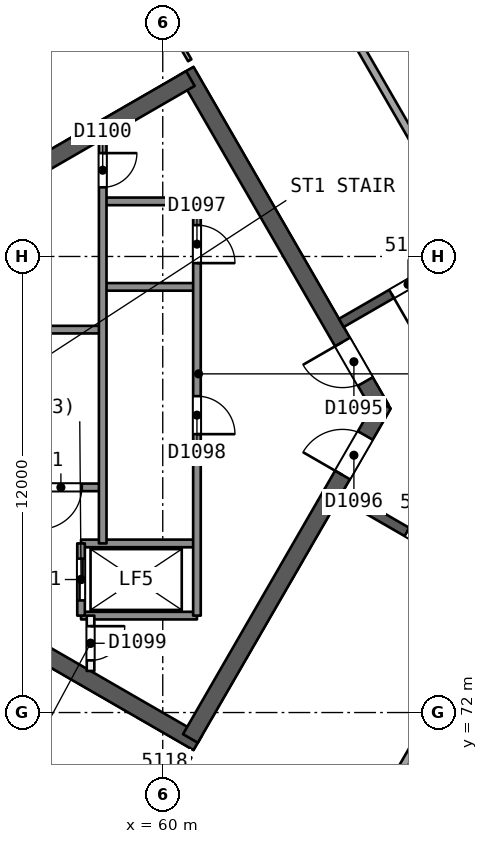
"""IFC4 building model, lengths in metres.
Left out: names, types, materials, properties, quantities, classifications, styles, units other than length and angle.
Written with IfcOpenShell. Run it as: python <this file> out.ifc"""

import sys

from ifc_helpers import new_model, si_unit, direction, frame, frame_2d, origin, place, context, subcontext, project, spatial, rectangle, extrude, element, fill, save


model = new_model("IFC4")
c1 = context("Model", 3, precision=1e-05, world=origin(), true_north=direction((0.0, 1.0)))
c2 = subcontext(c1, "Body", "Model", "MODEL_VIEW")
j1 = project(units=[si_unit("LENGTHUNIT", "METRE"), si_unit("PLANEANGLEUNIT", "RADIAN")], contexts=[c1])
p1 = place(None, origin())
s1 = spatial("IfcSite", under=j1, at=p1, CompositionType="ELEMENT")
p2 = place(p1, origin())
s2 = spatial("IfcBuilding", under=s1, at=p2, CompositionType="ELEMENT")
p3 = place(p2, frame((0.0, 0.0, 209.5)))
s3 = spatial("IfcBuildingStorey", under=s2, at=p3, CompositionType="ELEMENT", Elevation=209.5)
p4 = place(p3, frame((65.74, 80.0, 0.0), z_axis=(0.0, 0.0, 1.0), x_axis=(-0.499991857942, 0.866030104553, 0.0)))
e1 = element("IfcWall", 1, at=p4, inside=s3, PredefinedType="SHEAR", context=c2, shape_type="SweptSolid", body=[
    extrude(rectangle(XDim=10.25, YDim=0.45, at=frame_2d((5.125, 0.0))), origin(), (0.0, 0.0, 1.0), 3.7),
])
p5 = place(p4, frame((0.82, 0.0, 0.0)))
e2 = element("IfcOpeningElement", 2, at=p5, cuts=e1, PredefinedType="OPENING", context=c2, shape_type="SweptSolid", body=[
    extrude(rectangle(XDim=1.2, YDim=2.1, at=frame_2d((0.6, 1.05))), frame((0.0, 0.235, 0.0), z_axis=(0.0, -1.0, 0.0), x_axis=(1.0, 0.0, 0.0)), (0.0, 0.0, 1.0), 0.471),
])
p6 = place(p3, frame((60.728, 88.682, 0.0), z_axis=(0.0, 0.0, 1.0), x_axis=(-0.866021613849, -0.500006564303, 0.0)))
e3 = element("IfcWall", 3, at=p6, inside=s3, PredefinedType="SHEAR", context=c2, shape_type="SweptSolid", body=[
    extrude(rectangle(XDim=14.108, YDim=0.45, at=frame_2d((7.054, 0.0))), origin(), (0.0, 0.0, 1.0), 3.7),
])
p7 = place(p3, frame((48.622, 78.307, 0.0), z_axis=(0.0, 0.0, 1.0), x_axis=(0.86602701116, -0.499997215934, 0.0)))
e4 = element("IfcWall", 4, at=p7, inside=s3, PredefinedType="SHEAR", context=c2, shape_type="SweptSolid", body=[
    extrude(rectangle(XDim=14.204, YDim=0.45, at=frame_2d((7.102, 0.0))), origin(), (0.0, 0.0, 1.0), 3.7),
])
p8 = place(p3, frame((60.728, 71.318, 0.0), z_axis=(0.0, 0.0, 1.0), x_axis=(0.500012416173, 0.866018235185, 0.0)))
e5 = element("IfcWall", 5, at=p8, inside=s3, PredefinedType="SHEAR", context=c2, shape_type="SweptSolid", body=[
    extrude(rectangle(XDim=10.155, YDim=0.45, at=frame_2d((5.078, 0.0))), origin(), (0.0, 0.0, 1.0), 3.7),
])
p9 = place(p8, frame((8.005, 0.0, 0.0)))
e6 = element("IfcOpeningElement", 6, at=p9, cuts=e5, PredefinedType="OPENING", context=c2, shape_type="SweptSolid", body=[
    extrude(rectangle(XDim=1.2, YDim=2.1, at=frame_2d((0.6, 1.05))), frame((0.0, 0.235, 0.0), z_axis=(0.0, -1.0, 0.0), x_axis=(1.0, 0.0, 0.0)), (0.0, 0.0, 1.0), 0.471),
])
p10 = place(p3, frame((78.2, 90.046, 0.0), z_axis=(0.0, 0.0, 1.0), x_axis=(-0.866026492143, -0.499998114903, 0.0)))
e7 = element("IfcWall", 7, at=p10, inside=s3, PredefinedType="SHEAR", context=c2, shape_type="SweptSolid", body=[
    extrude(rectangle(XDim=15.588, YDim=0.25, at=frame_2d((7.794, 0.0))), origin(), (0.0, 0.0, 1.0), 3.3),
])
p11 = place(p10, frame((1.527, 0.0, 0.0)))
e8 = element("IfcOpeningElement", 8, at=p11, cuts=e7, PredefinedType="OPENING", context=c2, shape_type="SweptSolid", body=[
    extrude(rectangle(XDim=1.0, YDim=2.1, at=frame_2d((0.5, 1.05))), frame((0.0, 0.135, 0.0), z_axis=(0.0, -1.0, 0.0), x_axis=(1.0, 0.0, 0.0)), (0.0, 0.0, 1.0), 0.271),
])
p12 = place(p10, frame((8.694, 0.0, 0.0)))
e9 = element("IfcOpeningElement", 9, at=p12, cuts=e7, PredefinedType="OPENING", context=c2, shape_type="SweptSolid", body=[
    extrude(rectangle(XDim=1.1, YDim=2.1, at=frame_2d((0.55, 1.05))), frame((0.0, 0.135, 0.0), z_axis=(0.0, -1.0, 0.0), x_axis=(1.0, 0.0, 0.0)), (0.0, 0.0, 1.0), 0.271),
])
p13 = place(p10, frame((13.062, 0.0, 0.0)))
e10 = element("IfcOpeningElement", 10, at=p13, cuts=e7, PredefinedType="OPENING", context=c2, shape_type="SweptSolid", body=[
    extrude(rectangle(XDim=1.0, YDim=2.1, at=frame_2d((0.5, 1.05))), frame((0.0, 0.135, 0.0), z_axis=(0.0, -1.0, 0.0), x_axis=(1.0, 0.0, 0.0)), (0.0, 0.0, 1.0), 0.271),
])
p14 = place(p3, frame((64.7, 77.748, 0.0), z_axis=(0.0, 0.0, 1.0), x_axis=(0.866026492143, -0.499998114903, 0.0)))
e11 = element("IfcWall", 11, at=p14, inside=s3, PredefinedType="SHEAR", context=c2, shape_type="SweptSolid", body=[
    extrude(rectangle(XDim=15.588, YDim=0.25, at=frame_2d((7.794, 0.0))), origin(), (0.0, 0.0, 1.0), 3.3),
])
p15 = place(p14, frame((1.994, 0.0, 0.0)))
e12 = element("IfcOpeningElement", 12, at=p15, cuts=e11, PredefinedType="OPENING", context=c2, shape_type="SweptSolid", body=[
    extrude(rectangle(XDim=1.0, YDim=2.1, at=frame_2d((0.5, 1.05))), frame((0.0, 0.135, 0.0), z_axis=(0.0, -1.0, 0.0), x_axis=(1.0, 0.0, 0.0)), (0.0, 0.0, 1.0), 0.271),
])
p16 = place(p14, frame((6.571, 0.0, 0.0)))
e13 = element("IfcOpeningElement", 13, at=p16, cuts=e11, PredefinedType="OPENING", context=c2, shape_type="SweptSolid", body=[
    extrude(rectangle(XDim=1.2, YDim=2.4, at=frame_2d((0.6, 1.2))), frame((0.0, 0.135, 0.0), z_axis=(0.0, -1.0, 0.0), x_axis=(1.0, 0.0, 0.0)), (0.0, 0.0, 1.0), 0.271),
])
p17 = place(p14, frame((11.971, 0.0, 0.0)))
e14 = element("IfcOpeningElement", 14, at=p17, cuts=e11, PredefinedType="OPENING", context=c2, shape_type="SweptSolid", body=[
    extrude(rectangle(XDim=1.0, YDim=2.1, at=frame_2d((0.5, 1.05))), frame((0.0, 0.135, 0.0), z_axis=(0.0, -1.0, 0.0), x_axis=(1.0, 0.0, 0.0)), (0.0, 0.0, 1.0), 0.271),
])
p18 = place(p3, frame((62.896, 93.481, 0.0), z_axis=(0.0, 0.0, 1.0), x_axis=(0.499993571489, -0.866029115255, 0.0)))
e15 = element("IfcWall", 15, at=p18, inside=s3, PredefinedType="PARTITIONING", context=c2, shape_type="SweptSolid", body=[
    extrude(rectangle(XDim=10.627, YDim=0.2, at=frame_2d((5.313, 0.0))), origin(), (0.0, 0.0, 1.0), 3.3),
])
p19 = place(p3, frame((59.386, 91.455, 0.0), z_axis=(0.0, 0.0, 1.0), x_axis=(0.49995654735, -0.86605048973, 0.0)))
e16 = element("IfcWall", 16, at=p19, inside=s3, PredefinedType="PARTITIONING", context=c2, shape_type="SweptSolid", body=[
    extrude(rectangle(XDim=2.648, YDim=0.1, at=frame_2d((1.324, 0.0))), origin(), (0.0, 0.0, 1.0), 3.3),
])
p20 = place(p19, frame((0.874, 0.0, 0.0)))
e17 = element("IfcOpeningElement", 17, at=p20, cuts=e16, PredefinedType="OPENING", context=c2, shape_type="SweptSolid", body=[
    extrude(rectangle(XDim=0.9, YDim=2.1, at=frame_2d((0.45, 1.05))), frame((0.0, 0.061, 0.0), z_axis=(0.0, -1.0, 0.0), x_axis=(1.0, 0.0, 0.0)), (0.0, 0.0, 1.0), 0.121),
])
p21 = place(p3, frame((60.71, 70.838, 0.0), z_axis=(0.0, 0.0, 1.0), x_axis=(-0.49995654735, -0.86605048973, 0.0)))
e18 = element("IfcWall", 18, at=p21, inside=s3, PredefinedType="PARTITIONING", context=c2, shape_type="SweptSolid", body=[
    extrude(rectangle(XDim=2.648, YDim=0.1, at=frame_2d((1.324, 0.0))), origin(), (0.0, 0.0, 1.0), 3.3),
])
p22 = place(p21, frame((0.874, 0.0, 0.0)))
e19 = element("IfcOpeningElement", 19, at=p22, cuts=e18, PredefinedType="OPENING", context=c2, shape_type="SweptSolid", body=[
    extrude(rectangle(XDim=0.9, YDim=2.1, at=frame_2d((0.45, 1.05))), frame((0.0, 0.061, 0.0), z_axis=(0.0, -1.0, 0.0), x_axis=(1.0, 0.0, 0.0)), (0.0, 0.0, 1.0), 0.121),
])
p23 = place(p3, frame((63.707, 66.051, 0.0), z_axis=(0.0, 0.0, 1.0), x_axis=(0.499993571489, 0.866029115255, 0.0)))
e20 = element("IfcWall", 20, at=p23, inside=s3, PredefinedType="PARTITIONING", context=c2, shape_type="SweptSolid", body=[
    extrude(rectangle(XDim=10.627, YDim=0.2, at=frame_2d((5.313, 0.0))), origin(), (0.0, 0.0, 1.0), 3.3),
])
p24 = place(p3, frame((43.802, 82.63, 0.0), z_axis=(0.0, 0.0, 1.0), x_axis=(0.866026224187, 0.499998579018, 0.0)))
e21 = element("IfcWall", 21, at=p24, inside=s3, PredefinedType="SOLIDWALL", context=c2, shape_type="SweptSolid", body=[
    extrude(rectangle(XDim=51.406, YDim=0.3, at=frame_2d((25.703, 0.0))), origin(), (0.0, 0.0, 1.0), 3.3),
])
p25 = place(p24, frame((24.503, 0.0, 0.0)))
e22 = element("IfcOpeningElement", 22, at=p25, cuts=e21, PredefinedType="OPENING", context=c2, shape_type="SweptSolid", body=[
    extrude(rectangle(XDim=2.4, YDim=2.4, at=frame_2d((1.2, 1.2))), frame((0.0, 0.161, 0.0), z_axis=(0.0, -1.0, 0.0), x_axis=(1.0, 0.0, 0.0)), (0.0, 0.0, 1.0), 0.321),
])
p26 = place(p24, frame((30.271, 0.0, 0.0)))
e23 = element("IfcOpeningElement", 23, at=p26, cuts=e21, PredefinedType="OPENING", context=c2, shape_type="SweptSolid", body=[
    extrude(rectangle(XDim=2.4, YDim=2.4, at=frame_2d((1.2, 1.2))), frame((0.0, 0.161, 0.0), z_axis=(0.0, -1.0, 0.0), x_axis=(1.0, 0.0, 0.0)), (0.0, 0.0, 1.0), 0.321),
])
p27 = place(p24, frame((39.983, 0.0, 0.0)))
e24 = element("IfcOpeningElement", 24, at=p27, cuts=e21, PredefinedType="OPENING", context=c2, shape_type="SweptSolid", body=[
    extrude(rectangle(XDim=2.4, YDim=2.4, at=frame_2d((1.2, 1.2))), frame((0.0, 0.161, 0.0), z_axis=(0.0, -1.0, 0.0), x_axis=(1.0, 0.0, 0.0)), (0.0, 0.0, 1.0), 0.321),
])
p28 = place(p24, frame((18.736, 0.0, 0.0)))
e25 = element("IfcOpeningElement", 25, at=p28, cuts=e21, PredefinedType="OPENING", context=c2, shape_type="SweptSolid", body=[
    extrude(rectangle(XDim=2.4, YDim=2.4, at=frame_2d((1.2, 1.2))), frame((0.0, 0.161, 0.0), z_axis=(0.0, -1.0, 0.0), x_axis=(1.0, 0.0, 0.0)), (0.0, 0.0, 1.0), 0.321),
])
p29 = place(p24, frame((9.0, 0.0, 0.0)))
e26 = element("IfcOpeningElement", 26, at=p29, cuts=e21, PredefinedType="OPENING", context=c2, shape_type="SweptSolid", body=[
    extrude(rectangle(XDim=2.4, YDim=2.4, at=frame_2d((1.2, 1.2))), frame((0.0, 0.161, 0.0), z_axis=(0.0, -1.0, 0.0), x_axis=(1.0, 0.0, 0.0)), (0.0, 0.0, 1.0), 0.321),
])
p30 = place(p3, frame((88.322, 51.667, 0.0), z_axis=(0.0, 0.0, 1.0), x_axis=(-0.866026224187, 0.499998579018, 0.0)))
e27 = element("IfcWall", 27, at=p30, inside=s3, PredefinedType="SOLIDWALL", context=c2, shape_type="SweptSolid", body=[
    extrude(rectangle(XDim=51.406, YDim=0.3, at=frame_2d((25.703, 0.0))), origin(), (0.0, 0.0, 1.0), 3.3),
])
p31 = place(p30, frame((29.803, 0.0, 0.0)))
e28 = element("IfcOpeningElement", 28, at=p31, cuts=e27, PredefinedType="OPENING", context=c2, shape_type="SweptSolid", body=[
    extrude(rectangle(XDim=2.4, YDim=2.4, at=frame_2d((1.2, 1.2))), frame((0.0, 0.161, 0.0), z_axis=(0.0, -1.0, 0.0), x_axis=(1.0, 0.0, 0.0)), (0.0, 0.0, 1.0), 0.321),
])
p32 = place(p30, frame((39.983, 0.0, 0.0)))
e29 = element("IfcOpeningElement", 29, at=p32, cuts=e27, PredefinedType="OPENING", context=c2, shape_type="SweptSolid", body=[
    extrude(rectangle(XDim=2.4, YDim=2.4, at=frame_2d((1.2, 1.2))), frame((0.0, 0.161, 0.0), z_axis=(0.0, -1.0, 0.0), x_axis=(1.0, 0.0, 0.0)), (0.0, 0.0, 1.0), 0.321),
])
p33 = place(p30, frame((19.827, 0.0, 0.0)))
e30 = element("IfcOpeningElement", 30, at=p33, cuts=e27, PredefinedType="OPENING", context=c2, shape_type="SweptSolid", body=[
    extrude(rectangle(XDim=2.4, YDim=2.4, at=frame_2d((1.2, 1.2))), frame((0.0, 0.161, 0.0), z_axis=(0.0, -1.0, 0.0), x_axis=(1.0, 0.0, 0.0)), (0.0, 0.0, 1.0), 0.321),
])
p34 = place(p30, frame((9.0, 0.0, 0.0)))
e31 = element("IfcOpeningElement", 31, at=p34, cuts=e27, PredefinedType="OPENING", context=c2, shape_type="SweptSolid", body=[
    extrude(rectangle(XDim=2.4, YDim=2.4, at=frame_2d((1.2, 1.2))), frame((0.0, 0.161, 0.0), z_axis=(0.0, -1.0, 0.0), x_axis=(1.0, 0.0, 0.0)), (0.0, 0.0, 1.0), 0.321),
])
p35 = place(p30, frame((25.427, 0.0, 0.9)))
e32 = element("IfcOpeningElement", 32, at=p35, cuts=e27, PredefinedType="OPENING", context=c2, shape_type="SweptSolid", body=[
    extrude(rectangle(XDim=1.8, YDim=1.5, at=frame_2d((0.9, 0.75))), frame((0.0, 0.161, 0.0), z_axis=(0.0, -1.0, 0.0), x_axis=(1.0, 0.0, 0.0)), (0.0, 0.0, 1.0), 0.321),
])
for number, where, z_axis, x_axis in (
    (33, (60.9, 85.45, 0.0), (0.0, 0.0, 1.0), (-1.0, 0.0, 0.0)),
    (34, (60.9, 83.2, 0.0), (0.0, 0.0, 1.0), (-1.0, 0.0, 0.0)),
):
    element("IfcWall", number, at=place(p3, frame(where, z_axis=z_axis, x_axis=x_axis)), inside=s3, PredefinedType="SOLIDWALL", context=c2, shape_type="SweptSolid", body=[
        extrude(rectangle(XDim=2.48, YDim=0.2, at=frame_2d((1.24, 0.0))), origin(), (0.0, 0.0, 1.0), 3.3),
    ])
p36 = place(p3, frame((58.42, 82.075, 0.0), z_axis=(0.0, 0.0, 1.0), x_axis=(-1.0, 0.0, 0.0)))
e35 = element("IfcWall", 35, at=p36, inside=s3, PredefinedType="SOLIDWALL", context=c2, shape_type="SweptSolid", body=[
    extrude(rectangle(XDim=7.7, YDim=0.2, at=frame_2d((3.85, 0.0))), origin(), (0.0, 0.0, 1.0), 3.3),
])
p37 = place(p3, frame((58.42, 77.925, 0.0), z_axis=(0.0, 0.0, 1.0), x_axis=(-1.0, 0.0, 0.0)))
e36 = element("IfcWall", 36, at=p37, inside=s3, PredefinedType="SOLIDWALL", context=c2, shape_type="SweptSolid", body=[
    extrude(rectangle(XDim=7.7, YDim=0.2, at=frame_2d((3.85, 0.0))), origin(), (0.0, 0.0, 1.0), 3.3),
])
p38 = place(p37, frame((0.55, 0.0, 0.0)))
e37 = element("IfcOpeningElement", 37, at=p38, cuts=e36, PredefinedType="OPENING", context=c2, shape_type="SweptSolid", body=[
    extrude(rectangle(XDim=1.1, YDim=2.1, at=frame_2d((0.55, 1.05))), frame((0.0, 0.11, 0.0), z_axis=(0.0, -1.0, 0.0), x_axis=(1.0, 0.0, 0.0)), (0.0, 0.0, 1.0), 0.221),
])
for number, where, z_axis, x_axis in (
    (38, (60.9, 76.45, 0.0), (0.0, 0.0, 1.0), (-1.0, 0.0, 0.0)),
    (39, (60.9, 74.55, 0.0), (0.0, 0.0, 1.0), (-1.0, 0.0, 0.0)),
):
    element("IfcWall", number, at=place(p3, frame(where, z_axis=z_axis, x_axis=x_axis)), inside=s3, PredefinedType="SOLIDWALL", context=c2, shape_type="SweptSolid", body=[
        extrude(rectangle(XDim=3.05, YDim=0.2, at=frame_2d((1.525, 0.0))), origin(), (0.0, 0.0, 1.0), 3.3),
    ])
p39 = place(p3, frame((60.9, 85.45, 0.0), z_axis=(0.0, 0.0, 1.0), x_axis=(0.0, -1.0, 0.0)))
e40 = element("IfcWall", 40, at=p39, inside=s3, PredefinedType="SOLIDWALL", context=c2, shape_type="SweptSolid", body=[
    extrude(rectangle(XDim=10.9, YDim=0.2, at=frame_2d((5.45, 0.0))), origin(), (0.0, 0.0, 1.0), 3.3),
])
p40 = place(p39, frame((0.625, 0.0, 0.0)))
e41 = element("IfcOpeningElement", 41, at=p40, cuts=e40, PredefinedType="OPENING", context=c2, shape_type="SweptSolid", body=[
    extrude(rectangle(XDim=1.0, YDim=2.1, at=frame_2d((0.5, 1.05))), frame((0.0, 0.11, 0.0), z_axis=(0.0, -1.0, 0.0), x_axis=(1.0, 0.0, 0.0)), (0.0, 0.0, 1.0), 0.221),
])
p41 = place(p39, frame((5.125, 0.0, 0.0)))
e42 = element("IfcOpeningElement", 42, at=p41, cuts=e40, PredefinedType="OPENING", context=c2, shape_type="SweptSolid", body=[
    extrude(rectangle(XDim=1.0, YDim=2.1, at=frame_2d((0.5, 1.05))), frame((0.0, 0.11, 0.0), z_axis=(0.0, -1.0, 0.0), x_axis=(1.0, 0.0, 0.0)), (0.0, 0.0, 1.0), 0.221),
])
p42 = place(p3, frame((58.42, 87.09, 0.0), z_axis=(0.0, 0.0, 1.0), x_axis=(0.0, -1.0, 0.0)))
e43 = element("IfcWall", 43, at=p42, inside=s3, PredefinedType="SOLIDWALL", context=c2, shape_type="SweptSolid", body=[
    extrude(rectangle(XDim=10.64, YDim=0.2, at=frame_2d((5.32, 0.0))), origin(), (0.0, 0.0, 1.0), 3.3),
])
p43 = place(p42, frame((0.37, 0.0, 0.0)))
e44 = element("IfcOpeningElement", 44, at=p43, cuts=e43, PredefinedType="OPENING", context=c2, shape_type="SweptSolid", body=[
    extrude(rectangle(XDim=0.9, YDim=2.1, at=frame_2d((0.45, 1.05))), frame((0.0, 0.11, 0.0), z_axis=(0.0, -1.0, 0.0), x_axis=(1.0, 0.0, 0.0)), (0.0, 0.0, 1.0), 0.221),
])
p44 = place(p3, frame((58.1, 74.55, 0.0), z_axis=(0.0, 0.0, 1.0), x_axis=(0.0, -1.0, 0.0)))
e45 = element("IfcWall", 45, at=p44, inside=s3, PredefinedType="PARTITIONING", context=c2, shape_type="SweptSolid", body=[
    extrude(rectangle(XDim=1.455, YDim=0.2, at=frame_2d((0.728, 0.0))), origin(), (0.0, 0.0, 1.0), 3.3),
])
p45 = place(p44, frame((0.278, 0.0, 0.0)))
e46 = element("IfcOpeningElement", 46, at=p45, cuts=e45, PredefinedType="OPENING", context=c2, shape_type="SweptSolid", body=[
    extrude(rectangle(XDim=0.9, YDim=2.1, at=frame_2d((0.45, 1.05))), frame((0.0, 0.11, 0.0), z_axis=(0.0, -1.0, 0.0), x_axis=(1.0, 0.0, 0.0)), (0.0, 0.0, 1.0), 0.221),
])
p46 = place(p3, frame((57.85, 76.45, 0.0), z_axis=(0.0, 0.0, 1.0), x_axis=(0.0, -1.0, 0.0)))
e47 = element("IfcWall", 47, at=p46, inside=s3, PredefinedType="SOLIDWALL", context=c2, shape_type="SweptSolid", body=[
    extrude(rectangle(XDim=1.9, YDim=0.2, at=frame_2d((0.95, 0.0))), origin(), (0.0, 0.0, 1.0), 3.3),
])
p47 = place(p46, frame((0.4, 0.0, 0.0)))
e48 = element("IfcOpeningElement", 48, at=p47, cuts=e47, PredefinedType="OPENING", context=c2, shape_type="SweptSolid", body=[
    extrude(rectangle(XDim=1.1, YDim=2.1, at=frame_2d((0.55, 1.05))), frame((0.0, 0.11, 0.0), z_axis=(0.0, -1.0, 0.0), x_axis=(1.0, 0.0, 0.0)), (0.0, 0.0, 1.0), 0.221),
])
p48 = place(p13, origin())
e49 = element("IfcDoor", 49, at=p48, inside=s3, OperationType="SINGLE_SWING_RIGHT", PredefinedType="NOTDEFINED", context=c2, shape_type="SweptSolid", body=[
    extrude(rectangle(XDim=1.0, YDim=2.1, at=frame_2d((0.5, 1.05))), frame((0.0, 0.025, 0.0), z_axis=(0.0, -1.0, 0.0), x_axis=(1.0, 0.0, 0.0)), (0.0, 0.0, 1.0), 0.05),
])
fill(e10, e49)
p49 = place(p15, origin())
e50 = element("IfcDoor", 50, at=p49, inside=s3, OperationType="SINGLE_SWING_LEFT", PredefinedType="NOTDEFINED", context=c2, shape_type="SweptSolid", body=[
    extrude(rectangle(XDim=1.0, YDim=2.1, at=frame_2d((0.5, 1.05))), frame((0.0, 0.025, 0.0), z_axis=(0.0, -1.0, 0.0), x_axis=(1.0, 0.0, 0.0)), (0.0, 0.0, 1.0), 0.05),
])
fill(e12, e50)
p50 = place(p5, origin())
e51 = element("IfcDoor", 51, at=p50, inside=s3, OperationType="SINGLE_SWING_RIGHT", PredefinedType="NOTDEFINED", context=c2, shape_type="SweptSolid", body=[
    extrude(rectangle(XDim=1.2, YDim=2.1, at=frame_2d((0.6, 1.05))), frame((0.0, 0.025, 0.0), z_axis=(0.0, -1.0, 0.0), x_axis=(1.0, 0.0, 0.0)), (0.0, 0.0, 1.0), 0.05),
])
fill(e2, e51)
p51 = place(p9, origin())
e52 = element("IfcDoor", 52, at=p51, inside=s3, OperationType="SINGLE_SWING_LEFT", PredefinedType="NOTDEFINED", context=c2, shape_type="SweptSolid", body=[
    extrude(rectangle(XDim=1.2, YDim=2.1, at=frame_2d((0.6, 1.05))), frame((0.0, 0.025, 0.0), z_axis=(0.0, -1.0, 0.0), x_axis=(1.0, 0.0, 0.0)), (0.0, 0.0, 1.0), 0.05),
])
fill(e6, e52)
p52 = place(p47, origin())
e53 = element("IfcDoor", 53, at=p52, inside=s3, OperationType="SLIDING_TO_RIGHT", PredefinedType="NOTDEFINED", context=c2, shape_type="SweptSolid", body=[
    extrude(rectangle(XDim=1.1, YDim=2.1, at=frame_2d((0.55, 1.05))), frame((0.0, 0.025, 0.0), z_axis=(0.0, -1.0, 0.0), x_axis=(1.0, 0.0, 0.0)), (0.0, 0.0, 1.0), 0.05),
])
fill(e48, e53)
p53 = place(p40, origin())
e54 = element("IfcDoor", 54, at=p53, inside=s3, OperationType="SINGLE_SWING_RIGHT", PredefinedType="NOTDEFINED", context=c2, shape_type="SweptSolid", body=[
    extrude(rectangle(XDim=1.0, YDim=2.1, at=frame_2d((0.5, 1.05))), frame((0.0, 0.025, 0.0), z_axis=(0.0, -1.0, 0.0), x_axis=(1.0, 0.0, 0.0)), (0.0, 0.0, 1.0), 0.05),
])
fill(e41, e54)
p54 = place(p41, origin())
e55 = element("IfcDoor", 55, at=p54, inside=s3, OperationType="SINGLE_SWING_RIGHT", PredefinedType="NOTDEFINED", context=c2, shape_type="SweptSolid", body=[
    extrude(rectangle(XDim=1.0, YDim=2.1, at=frame_2d((0.5, 1.05))), frame((0.0, 0.025, 0.0), z_axis=(0.0, -1.0, 0.0), x_axis=(1.0, 0.0, 0.0)), (0.0, 0.0, 1.0), 0.05),
])
fill(e42, e55)
p55 = place(p45, origin())
e56 = element("IfcDoor", 56, at=p55, inside=s3, OperationType="SINGLE_SWING_LEFT", PredefinedType="NOTDEFINED", context=c2, shape_type="SweptSolid", body=[
    extrude(rectangle(XDim=0.9, YDim=2.1, at=frame_2d((0.45, 1.05))), frame((0.0, 0.025, 0.0), z_axis=(0.0, -1.0, 0.0), x_axis=(1.0, 0.0, 0.0)), (0.0, 0.0, 1.0), 0.05),
])
fill(e46, e56)
p56 = place(p43, origin())
e57 = element("IfcDoor", 57, at=p56, inside=s3, OperationType="SINGLE_SWING_LEFT", PredefinedType="NOTDEFINED", context=c2, shape_type="SweptSolid", body=[
    extrude(rectangle(XDim=0.9, YDim=2.1, at=frame_2d((0.45, 1.05))), frame((0.0, 0.025, 0.0), z_axis=(0.0, -1.0, 0.0), x_axis=(1.0, 0.0, 0.0)), (0.0, 0.0, 1.0), 0.05),
])
fill(e44, e57)
p57 = place(p38, origin())
e58 = element("IfcDoor", 58, at=p57, inside=s3, OperationType="SINGLE_SWING_RIGHT", PredefinedType="NOTDEFINED", context=c2, shape_type="SweptSolid", body=[
    extrude(rectangle(XDim=1.1, YDim=2.1, at=frame_2d((0.55, 1.05))), frame((0.0, 0.025, 0.0), z_axis=(0.0, -1.0, 0.0), x_axis=(1.0, 0.0, 0.0)), (0.0, 0.0, 1.0), 0.05),
])
fill(e37, e58)
save(model, sys.argv[1])
